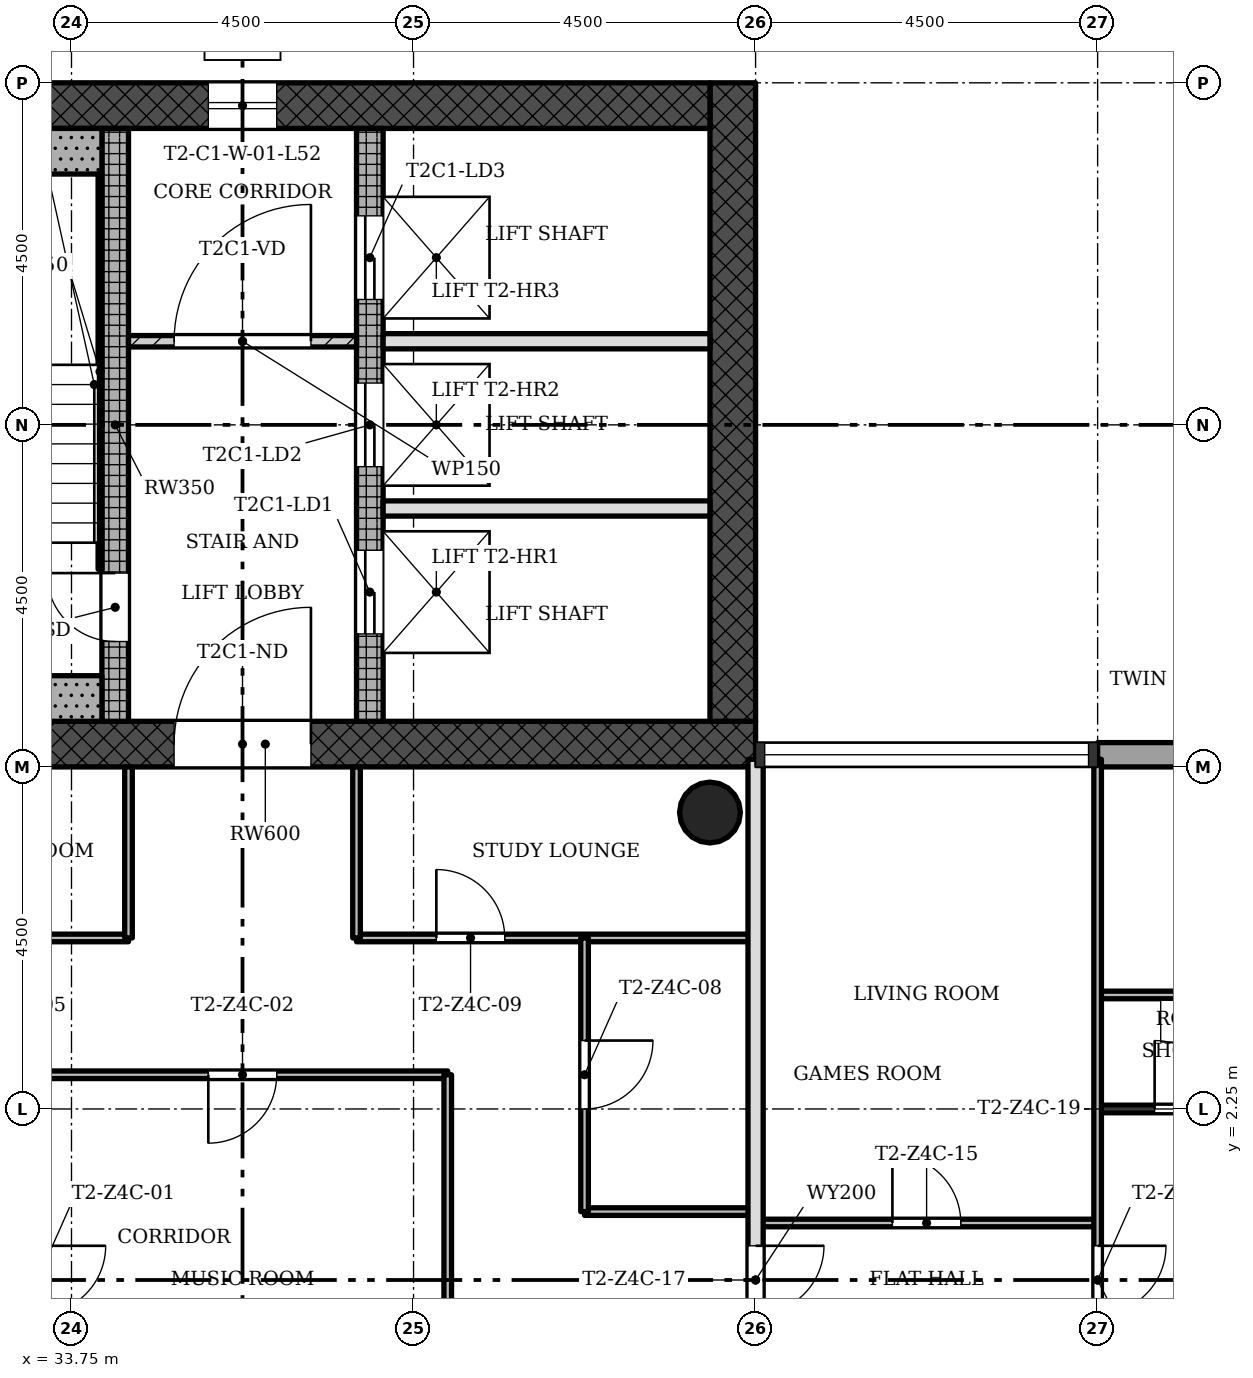
"""IFC4 building model, lengths in metres.
Left out: names, types, materials, properties, quantities, classifications, styles, units other than length and angle.
Written with IfcOpenShell. Run it as: python <this file> out.ifc"""

import sys

from ifc_helpers import new_model, si_unit, direction, frame, frame_2d, origin, origin_2d, place, context, subcontext, project, spatial, rectangle, hollow_circle, extrude, element, fill, save


model = new_model("IFC4")
c1 = context("Model", 3, precision=1e-05, world=origin(), true_north=direction((0.0, 1.0)))
c2 = subcontext(c1, "Body", "Model", "MODEL_VIEW")
j1 = project(units=[si_unit("LENGTHUNIT", "METRE"), si_unit("PLANEANGLEUNIT", "RADIAN")], contexts=[c1])
p1 = place(None, origin())
s1 = spatial("IfcSite", under=j1, at=p1, CompositionType="ELEMENT")
p2 = place(p1, origin())
s2 = spatial("IfcBuilding", under=s1, at=p2, CompositionType="ELEMENT")
p3 = place(p2, frame((0.0, 0.0, 189.2)))
s3 = spatial("IfcBuildingStorey", under=s2, at=p3, CompositionType="ELEMENT", Elevation=189.2)
p4 = place(p3, frame((29.85, 7.05, 0.0), z_axis=(0.0, 0.0, 1.0), x_axis=(1.0, 0.0, 0.0)))
e1 = element("IfcWall", 1, at=p4, inside=s3, PredefinedType="SHEAR", context=c2, shape_type="SweptSolid", body=[
    extrude(rectangle(XDim=12.9, YDim=0.6, at=frame_2d((6.45, 0.0))), origin(), (0.0, 0.0, 1.0), 3.4),
])
p5 = place(p4, frame((5.25, 0.0, 0.0)))
e2 = element("IfcOpeningElement", 2, at=p5, cuts=e1, PredefinedType="OPENING", context=c2, shape_type="SweptSolid", body=[
    extrude(rectangle(XDim=1.8, YDim=2.1, at=frame_2d((0.9, 1.05))), frame((0.0, 0.31, 0.0), z_axis=(0.0, -1.0, 0.0), x_axis=(1.0, 0.0, 0.0)), (0.0, 0.0, 1.0), 0.62),
])
p6 = place(p3, frame((42.45, 7.35, 0.0), z_axis=(0.0, 0.0, 1.0), x_axis=(0.0, 1.0, 0.0)))
e3 = element("IfcWall", 3, at=p6, inside=s3, PredefinedType="SHEAR", context=c2, shape_type="SweptSolid", body=[
    extrude(rectangle(XDim=8.4, YDim=0.6, at=frame_2d((4.2, 0.0))), origin(), (0.0, 0.0, 1.0), 3.4),
])
p7 = place(p3, frame((42.15, 15.45, 0.0), z_axis=(0.0, 0.0, 1.0), x_axis=(-1.0, 0.0, 0.0)))
e4 = element("IfcWall", 4, at=p7, inside=s3, PredefinedType="SHEAR", context=c2, shape_type="SweptSolid", body=[
    extrude(rectangle(XDim=12.9, YDim=0.6, at=frame_2d((6.45, 0.0))), origin(), (0.0, 0.0, 1.0), 3.4),
])
p8 = place(p7, frame((5.7, 0.0, 0.45)))
e5 = element("IfcOpeningElement", 5, at=p8, cuts=e4, PredefinedType="OPENING", context=c2, shape_type="SweptSolid", body=[
    extrude(rectangle(XDim=0.9, YDim=2.4, at=frame_2d((0.45, 1.2))), frame((0.0, 0.31, 0.0), z_axis=(0.0, -1.0, 0.0), x_axis=(1.0, 0.0, 0.0)), (0.0, 0.0, 1.0), 0.62),
])
p9 = place(p3, frame((34.325, 7.35, 0.0), z_axis=(0.0, 0.0, 1.0), x_axis=(0.0, 1.0, 0.0)))
e6 = element("IfcWall", 6, at=p9, inside=s3, PredefinedType="SHEAR", context=c2, shape_type="SweptSolid", body=[
    extrude(rectangle(XDim=7.8, YDim=0.35, at=frame_2d((3.9, 0.0))), origin(), (0.0, 0.0, 1.0), 3.4),
])
p10 = place(p9, frame((1.05, 0.0, 0.0)))
e7 = element("IfcOpeningElement", 7, at=p10, cuts=e6, PredefinedType="OPENING", context=c2, shape_type="SweptSolid", body=[
    extrude(rectangle(XDim=0.9, YDim=2.1, at=frame_2d((0.45, 1.05))), frame((0.0, 0.185, 0.0), z_axis=(0.0, -1.0, 0.0), x_axis=(1.0, 0.0, 0.0)), (0.0, 0.0, 1.0), 0.37),
])
p11 = place(p3, frame((37.675, 7.35, 0.0), z_axis=(0.0, 0.0, 1.0), x_axis=(0.0, 1.0, 0.0)))
e8 = element("IfcWall", 8, at=p11, inside=s3, PredefinedType="SHEAR", context=c2, shape_type="SweptSolid", body=[
    extrude(rectangle(XDim=7.8, YDim=0.35, at=frame_2d((3.9, 0.0))), origin(), (0.0, 0.0, 1.0), 3.4),
])
p12 = place(p11, frame((1.15, 0.0, 0.0)))
e9 = element("IfcOpeningElement", 9, at=p12, cuts=e8, PredefinedType="OPENING", context=c2, shape_type="SweptSolid", body=[
    extrude(rectangle(XDim=1.1, YDim=2.1, at=frame_2d((0.55, 1.05))), frame((0.0, 0.185, 0.0), z_axis=(0.0, -1.0, 0.0), x_axis=(1.0, 0.0, 0.0)), (0.0, 0.0, 1.0), 0.37),
])
p13 = place(p11, frame((3.35, 0.0, 0.0)))
e10 = element("IfcOpeningElement", 10, at=p13, cuts=e8, PredefinedType="OPENING", context=c2, shape_type="SweptSolid", body=[
    extrude(rectangle(XDim=1.1, YDim=2.1, at=frame_2d((0.55, 1.05))), frame((0.0, 0.185, 0.0), z_axis=(0.0, -1.0, 0.0), x_axis=(1.0, 0.0, 0.0)), (0.0, 0.0, 1.0), 0.37),
])
p14 = place(p11, frame((5.55, 0.0, 0.0)))
e11 = element("IfcOpeningElement", 11, at=p14, cuts=e8, PredefinedType="OPENING", context=c2, shape_type="SweptSolid", body=[
    extrude(rectangle(XDim=1.1, YDim=2.1, at=frame_2d((0.55, 1.05))), frame((0.0, 0.185, 0.0), z_axis=(0.0, -1.0, 0.0), x_axis=(1.0, 0.0, 0.0)), (0.0, 0.0, 1.0), 0.37),
])
p15 = place(p3, frame((42.15, 6.15, 0.0), z_axis=(0.0, 0.0, 1.0), x_axis=(1.0, 0.0, 0.0)))
e12 = element("IfcColumn", 12, at=p15, inside=s3, PredefinedType="COLUMN", context=c2, shape_type="SweptSolid", body=[
    extrude(hollow_circle(Radius=0.4, WallThickness=0.028, at=origin_2d()), origin(), (0.0, 0.0, 1.0), 3.4),
])
p16 = place(p3, frame((48.75, 6.91, -0.3), z_axis=(0.0, 0.0, 1.0), x_axis=(-1.0, 0.0, 0.0)))
e13 = element("IfcWall", 13, at=p16, inside=s3, PredefinedType="STANDARD", context=c2, shape_type="SweptSolid", body=[
    extrude(rectangle(XDim=1.5, YDim=0.32, at=frame_2d((0.75, 0.0))), origin(), (0.0, 0.0, 1.0), 3.4),
])
p17 = place(p3, frame((37.5, 12.35, 0.0), z_axis=(0.0, 0.0, 1.0), x_axis=(-1.0, 0.0, 0.0)))
e14 = element("IfcWall", 14, at=p17, inside=s3, PredefinedType="PARTITIONING", context=c2, shape_type="SweptSolid", body=[
    extrude(rectangle(XDim=3.0, YDim=0.15, at=frame_2d((1.5, 0.0))), origin(), (0.0, 0.0, 1.0), 3.0),
])
p18 = place(p17, frame((0.6, 0.0, 0.0)))
e15 = element("IfcOpeningElement", 15, at=p18, cuts=e14, PredefinedType="OPENING", context=c2, shape_type="SweptSolid", body=[
    extrude(rectangle(XDim=1.8, YDim=2.1, at=frame_2d((0.9, 1.05))), frame((0.0, 0.085, 0.0), z_axis=(0.0, -1.0, 0.0), x_axis=(1.0, 0.0, 0.0)), (0.0, 0.0, 1.0), 0.17),
])
for number, where, z_axis, x_axis in (
    (16, (42.15, 10.15, 0.0), (0.0, 0.0, 1.0), (-1.0, 0.0, 0.0)),
    (17, (42.15, 12.35, 0.0), (0.0, 0.0, 1.0), (-1.0, 0.0, 0.0)),
):
    element("IfcWall", number, at=place(p3, frame(where, z_axis=z_axis, x_axis=x_axis)), inside=s3, PredefinedType="SOLIDWALL", context=c2, shape_type="SweptSolid", body=[
        extrude(rectangle(XDim=4.3, YDim=0.2, at=frame_2d((2.15, 0.0))), origin(), (0.0, 0.0, 1.0), 3.0),
    ])
p19 = place(p3, frame((47.25, 0.75, 0.0), z_axis=(0.0, 0.0, 1.0), x_axis=(-1.0, 0.0, 0.0)))
e18 = element("IfcWall", 18, at=p19, inside=s3, PredefinedType="PARTITIONING", context=c2, shape_type="SweptSolid", body=[
    extrude(rectangle(XDim=4.5, YDim=0.1, at=frame_2d((2.25, 0.0))), origin(), (0.0, 0.0, 1.0), 3.0),
])
p20 = place(p19, frame((1.8, 0.0, 0.0)))
e19 = element("IfcOpeningElement", 19, at=p20, cuts=e18, PredefinedType="OPENING", context=c2, shape_type="SweptSolid", body=[
    extrude(rectangle(XDim=0.9, YDim=2.1, at=frame_2d((0.45, 1.05))), frame((0.0, 0.06, 0.0), z_axis=(0.0, -1.0, 0.0), x_axis=(1.0, 0.0, 0.0)), (0.0, 0.0, 1.0), 0.12),
])
p21 = place(p3, frame((42.75, 0.9, 0.0), z_axis=(0.0, 0.0, 1.0), x_axis=(-1.0, 0.0, 0.0)))
e20 = element("IfcWall", 20, at=p21, inside=s3, PredefinedType="PARTITIONING", context=c2, shape_type="SweptSolid", body=[
    extrude(rectangle(XDim=2.25, YDim=0.1, at=frame_2d((1.125, 0.0))), origin(), (0.0, 0.0, 1.0), 3.0),
])
p22 = place(p3, frame((51.85, 2.25, 0.0), z_axis=(0.0, 0.0, 1.0), x_axis=(-1.0, 0.0, 0.0)))
e21 = element("IfcWall", 21, at=p22, inside=s3, PredefinedType="PARTITIONING", context=c2, shape_type="SweptSolid", body=[
    extrude(rectangle(XDim=4.6, YDim=0.1, at=frame_2d((2.3, 0.0))), origin(), (0.0, 0.0, 1.0), 3.0),
])
p23 = place(p22, frame((2.95, 0.0, 0.0)))
e22 = element("IfcOpeningElement", 22, at=p23, cuts=e21, PredefinedType="OPENING", context=c2, shape_type="SweptSolid", body=[
    extrude(rectangle(XDim=0.9, YDim=2.1, at=frame_2d((0.45, 1.05))), frame((0.0, 0.06, 0.0), z_axis=(0.0, -1.0, 0.0), x_axis=(1.0, 0.0, 0.0)), (0.0, 0.0, 1.0), 0.12),
])
p24 = place(p22, frame((1.15, 0.0, 0.0)))
e23 = element("IfcOpeningElement", 23, at=p24, cuts=e21, PredefinedType="OPENING", context=c2, shape_type="SweptSolid", body=[
    extrude(rectangle(XDim=0.9, YDim=2.1, at=frame_2d((0.45, 1.05))), frame((0.0, 0.06, 0.0), z_axis=(0.0, -1.0, 0.0), x_axis=(1.0, 0.0, 0.0)), (0.0, 0.0, 1.0), 0.12),
])
p25 = place(p3, frame((38.7, 2.7, 0.0), z_axis=(0.0, 0.0, 1.0), x_axis=(-1.0, 0.0, 0.0)))
e24 = element("IfcWall", 24, at=p25, inside=s3, PredefinedType="PARTITIONING", context=c2, shape_type="SweptSolid", body=[
    extrude(rectangle(XDim=5.4, YDim=0.1, at=frame_2d((2.7, 0.0))), origin(), (0.0, 0.0, 1.0), 3.0),
])
p26 = place(p25, frame((2.25, 0.0, 0.0)))
e25 = element("IfcOpeningElement", 25, at=p26, cuts=e24, PredefinedType="OPENING", context=c2, shape_type="SweptSolid", body=[
    extrude(rectangle(XDim=0.9, YDim=2.1, at=frame_2d((0.45, 1.05))), frame((0.0, 0.06, 0.0), z_axis=(0.0, -1.0, 0.0), x_axis=(1.0, 0.0, 0.0)), (0.0, 0.0, 1.0), 0.12),
])
p27 = place(p3, frame((49.65, 3.75, 0.0), z_axis=(0.0, 0.0, 1.0), x_axis=(-1.0, 0.0, 0.0)))
e26 = element("IfcWall", 26, at=p27, inside=s3, PredefinedType="PARTITIONING", context=c2, shape_type="SweptSolid", body=[
    extrude(rectangle(XDim=2.4, YDim=0.1, at=frame_2d((1.2, 0.0))), origin(), (0.0, 0.0, 1.0), 3.0),
])
p28 = place(p3, frame((42.75, 4.5, 0.0), z_axis=(0.0, 0.0, 1.0), x_axis=(-1.0, 0.0, 0.0)))
e27 = element("IfcWall", 27, at=p28, inside=s3, PredefinedType="PARTITIONING", context=c2, shape_type="SweptSolid", body=[
    extrude(rectangle(XDim=5.25, YDim=0.1, at=frame_2d((2.625, 0.0))), origin(), (0.0, 0.0, 1.0), 3.0),
])
p29 = place(p28, frame((3.3, 0.0, 0.0)))
e28 = element("IfcOpeningElement", 28, at=p29, cuts=e27, PredefinedType="OPENING", context=c2, shape_type="SweptSolid", body=[
    extrude(rectangle(XDim=0.9, YDim=2.1, at=frame_2d((0.45, 1.05))), frame((0.0, 0.06, 0.0), z_axis=(0.0, -1.0, 0.0), x_axis=(1.0, 0.0, 0.0)), (0.0, 0.0, 1.0), 0.12),
])
p30 = place(p3, frame((34.5, 4.5, 0.0), z_axis=(0.0, 0.0, 1.0), x_axis=(-1.0, 0.0, 0.0)))
e29 = element("IfcWall", 29, at=p30, inside=s3, PredefinedType="PARTITIONING", context=c2, shape_type="SweptSolid", body=[
    extrude(rectangle(XDim=3.0, YDim=0.1, at=frame_2d((1.5, 0.0))), origin(), (0.0, 0.0, 1.0), 3.0),
])
p31 = place(p30, frame((1.05, 0.0, 0.0)))
e30 = element("IfcOpeningElement", 30, at=p31, cuts=e29, PredefinedType="OPENING", context=c2, shape_type="SweptSolid", body=[
    extrude(rectangle(XDim=0.9, YDim=2.1, at=frame_2d((0.45, 1.05))), frame((0.0, 0.06, 0.0), z_axis=(0.0, -1.0, 0.0), x_axis=(1.0, 0.0, 0.0)), (0.0, 0.0, 1.0), 0.12),
])
p32 = place(p3, frame((47.25, -6.85, 0.0), z_axis=(0.0, 0.0, 1.0), x_axis=(0.0, 1.0, 0.0)))
e31 = element("IfcWall", 31, at=p32, inside=s3, PredefinedType="PARTITIONING", context=c2, shape_type="SweptSolid", body=[
    extrude(rectangle(XDim=13.7, YDim=0.1, at=frame_2d((6.85, 0.0))), origin(), (0.0, 0.0, 1.0), 3.0),
])
p33 = place(p32, frame((6.4, 0.0, 0.0)))
e32 = element("IfcOpeningElement", 32, at=p33, cuts=e31, PredefinedType="OPENING", context=c2, shape_type="SweptSolid", body=[
    extrude(rectangle(XDim=0.9, YDim=2.1, at=frame_2d((0.45, 1.05))), frame((0.0, 0.06, 0.0), z_axis=(0.0, -1.0, 0.0), x_axis=(1.0, 0.0, 0.0)), (0.0, 0.0, 1.0), 0.12),
])
p34 = place(p3, frame((42.75, -6.85, 0.0), z_axis=(0.0, 0.0, 1.0), x_axis=(0.0, 1.0, 0.0)))
e33 = element("IfcWall", 33, at=p34, inside=s3, PredefinedType="SOLIDWALL", context=c2, shape_type="SweptSolid", body=[
    extrude(rectangle(XDim=13.7, YDim=0.2, at=frame_2d((6.85, 0.0))), origin(), (0.0, 0.0, 1.0), 3.0),
])
p35 = place(p34, frame((6.4, 0.0, 0.0)))
e34 = element("IfcOpeningElement", 34, at=p35, cuts=e33, PredefinedType="OPENING", context=c2, shape_type="SweptSolid", body=[
    extrude(rectangle(XDim=0.9, YDim=2.1, at=frame_2d((0.45, 1.05))), frame((0.0, 0.11, 0.0), z_axis=(0.0, -1.0, 0.0), x_axis=(1.0, 0.0, 0.0)), (0.0, 0.0, 1.0), 0.22),
])
p36 = place(p3, frame((40.5, 0.9, 0.0), z_axis=(0.0, 0.0, 1.0), x_axis=(0.0, 1.0, 0.0)))
e35 = element("IfcWall", 35, at=p36, inside=s3, PredefinedType="PARTITIONING", context=c2, shape_type="SweptSolid", body=[
    extrude(rectangle(XDim=3.6, YDim=0.1, at=frame_2d((1.8, 0.0))), origin(), (0.0, 0.0, 1.0), 3.0),
])
p37 = place(p36, frame((1.35, 0.0, 0.0)))
e36 = element("IfcOpeningElement", 36, at=p37, cuts=e35, PredefinedType="OPENING", context=c2, shape_type="SweptSolid", body=[
    extrude(rectangle(XDim=0.9, YDim=2.1, at=frame_2d((0.45, 1.05))), frame((0.0, 0.06, 0.0), z_axis=(0.0, -1.0, 0.0), x_axis=(1.0, 0.0, 0.0)), (0.0, 0.0, 1.0), 0.12),
])
p38 = place(p3, frame((38.7, -2.7, 0.0), z_axis=(0.0, 0.0, 1.0), x_axis=(0.0, 1.0, 0.0)))
e37 = element("IfcWall", 37, at=p38, inside=s3, PredefinedType="PARTITIONING", context=c2, shape_type="SweptSolid", body=[
    extrude(rectangle(XDim=5.4, YDim=0.1, at=frame_2d((2.7, 0.0))), origin(), (0.0, 0.0, 1.0), 3.0),
])
for number, where, z_axis, x_axis in (
    (38, (37.5, 4.5, 0.0), (0.0, 0.0, 1.0), (0.0, 1.0, 0.0)),
    (39, (34.5, 4.5, 0.0), (0.0, 0.0, 1.0), (0.0, 1.0, 0.0)),
):
    element("IfcWall", number, at=place(p3, frame(where, z_axis=z_axis, x_axis=x_axis)), inside=s3, PredefinedType="PARTITIONING", context=c2, shape_type="SweptSolid", body=[
        extrude(rectangle(XDim=2.25, YDim=0.1, at=frame_2d((1.125, 0.0))), origin(), (0.0, 0.0, 1.0), 3.0),
    ])
for number, where, z_axis, x_axis in (
    (40, (34.15, 14.85, 0.0), (0.0, 0.0, 1.0), (-1.0, 0.0, 0.0)),
    (41, (34.15, 7.65, 0.0), (0.0, 0.0, 1.0), (-1.0, 0.0, 0.0)),
):
    element("IfcWall", number, at=place(p3, frame(where, z_axis=z_axis, x_axis=x_axis)), inside=s3, PredefinedType="SHEAR", context=c2, shape_type="SweptSolid", body=[
        extrude(rectangle(XDim=4.3, YDim=0.6, at=frame_2d((2.15, 0.0))), origin(), (0.0, 0.0, 1.0), 3.4),
    ])
p39 = place(p3, frame((34.125, 9.35, 0.0), z_axis=(0.0, 0.0, 1.0), x_axis=(0.0, 1.0, 0.0)))
e42 = element("IfcWall", 42, at=p39, inside=s3, PredefinedType="SHEAR", context=c2, shape_type="SweptSolid", body=[
    extrude(rectangle(XDim=5.2, YDim=0.05, at=frame_2d((2.6, 0.0))), origin(), (0.0, 0.0, 1.0), 3.4),
])
p40 = place(p8, origin())
e43 = element("IfcWindow", 43, at=p40, inside=s3, PartitioningType="SINGLE_PANEL", PredefinedType="WINDOW", context=c2, shape_type="SweptSolid", body=[
    extrude(rectangle(XDim=0.9, YDim=2.4, at=frame_2d((0.45, 1.2))), frame((0.0, 0.03, 0.0), z_axis=(0.0, -1.0, 0.0), x_axis=(1.0, 0.0, 0.0)), (0.0, 0.0, 1.0), 0.06),
])
fill(e5, e43)
p41 = place(p18, origin())
e44 = element("IfcDoor", 44, at=p41, inside=s3, OperationType="SINGLE_SWING_LEFT", PredefinedType="DOOR", context=c2, shape_type="SweptSolid", body=[
    extrude(rectangle(XDim=1.8, YDim=2.1, at=frame_2d((0.9, 1.05))), frame((0.0, 0.025, 0.0), z_axis=(0.0, -1.0, 0.0), x_axis=(1.0, 0.0, 0.0)), (0.0, 0.0, 1.0), 0.05),
])
fill(e15, e44)
p42 = place(p26, origin())
e45 = element("IfcDoor", 45, at=p42, inside=s3, OperationType="SINGLE_SWING_LEFT", PredefinedType="DOOR", context=c2, shape_type="SweptSolid", body=[
    extrude(rectangle(XDim=0.9, YDim=2.1, at=frame_2d((0.45, 1.05))), frame((0.0, 0.025, 0.0), z_axis=(0.0, -1.0, 0.0), x_axis=(1.0, 0.0, 0.0)), (0.0, 0.0, 1.0), 0.05),
])
fill(e25, e45)
p43 = place(p37, origin())
e46 = element("IfcDoor", 46, at=p43, inside=s3, OperationType="SINGLE_SWING_RIGHT", PredefinedType="DOOR", context=c2, shape_type="SweptSolid", body=[
    extrude(rectangle(XDim=0.9, YDim=2.1, at=frame_2d((0.45, 1.05))), frame((0.0, 0.025, 0.0), z_axis=(0.0, -1.0, 0.0), x_axis=(1.0, 0.0, 0.0)), (0.0, 0.0, 1.0), 0.05),
])
fill(e36, e46)
p44 = place(p29, origin())
e47 = element("IfcDoor", 47, at=p44, inside=s3, OperationType="SINGLE_SWING_RIGHT", PredefinedType="DOOR", context=c2, shape_type="SweptSolid", body=[
    extrude(rectangle(XDim=0.9, YDim=2.1, at=frame_2d((0.45, 1.05))), frame((0.0, 0.025, 0.0), z_axis=(0.0, -1.0, 0.0), x_axis=(1.0, 0.0, 0.0)), (0.0, 0.0, 1.0), 0.05),
])
fill(e28, e47)
p45 = place(p20, origin())
e48 = element("IfcDoor", 48, at=p45, inside=s3, OperationType="SINGLE_SWING_RIGHT", PredefinedType="DOOR", context=c2, shape_type="SweptSolid", body=[
    extrude(rectangle(XDim=0.9, YDim=2.1, at=frame_2d((0.45, 1.05))), frame((0.0, 0.025, 0.0), z_axis=(0.0, -1.0, 0.0), x_axis=(1.0, 0.0, 0.0)), (0.0, 0.0, 1.0), 0.05),
])
fill(e19, e48)
p46 = place(p35, origin())
e49 = element("IfcDoor", 49, at=p46, inside=s3, OperationType="SINGLE_SWING_RIGHT", PredefinedType="DOOR", context=c2, shape_type="SweptSolid", body=[
    extrude(rectangle(XDim=0.9, YDim=2.1, at=frame_2d((0.45, 1.05))), frame((0.0, 0.025, 0.0), z_axis=(0.0, -1.0, 0.0), x_axis=(1.0, 0.0, 0.0)), (0.0, 0.0, 1.0), 0.05),
])
fill(e34, e49)
p47 = place(p33, origin())
e50 = element("IfcDoor", 50, at=p47, inside=s3, OperationType="SINGLE_SWING_RIGHT", PredefinedType="DOOR", context=c2, shape_type="SweptSolid", body=[
    extrude(rectangle(XDim=0.9, YDim=2.1, at=frame_2d((0.45, 1.05))), frame((0.0, 0.025, 0.0), z_axis=(0.0, -1.0, 0.0), x_axis=(1.0, 0.0, 0.0)), (0.0, 0.0, 1.0), 0.05),
])
fill(e32, e50)
p48 = place(p23, origin())
e51 = element("IfcDoor", 51, at=p48, inside=s3, OperationType="SINGLE_SWING_RIGHT", PredefinedType="DOOR", context=c2, shape_type="SweptSolid", body=[
    extrude(rectangle(XDim=0.9, YDim=2.1, at=frame_2d((0.45, 1.05))), frame((0.0, 0.025, 0.0), z_axis=(0.0, -1.0, 0.0), x_axis=(1.0, 0.0, 0.0)), (0.0, 0.0, 1.0), 0.05),
])
fill(e22, e51)
p49 = place(p10, origin())
e52 = element("IfcDoor", 52, at=p49, inside=s3, OperationType="SINGLE_SWING_LEFT", PredefinedType="DOOR", context=c2, shape_type="SweptSolid", body=[
    extrude(rectangle(XDim=0.9, YDim=2.1, at=frame_2d((0.45, 1.05))), frame((0.0, 0.025, 0.0), z_axis=(0.0, -1.0, 0.0), x_axis=(1.0, 0.0, 0.0)), (0.0, 0.0, 1.0), 0.05),
])
fill(e7, e52)
p50 = place(p12, origin())
e53 = element("IfcDoor", 53, at=p50, inside=s3, OperationType="SLIDING_TO_LEFT", PredefinedType="DOOR", context=c2, shape_type="SweptSolid", body=[
    extrude(rectangle(XDim=1.1, YDim=2.1, at=frame_2d((0.55, 1.05))), frame((0.0, 0.025, 0.0), z_axis=(0.0, -1.0, 0.0), x_axis=(1.0, 0.0, 0.0)), (0.0, 0.0, 1.0), 0.05),
])
fill(e9, e53)
p51 = place(p13, origin())
e54 = element("IfcDoor", 54, at=p51, inside=s3, OperationType="SLIDING_TO_LEFT", PredefinedType="DOOR", context=c2, shape_type="SweptSolid", body=[
    extrude(rectangle(XDim=1.1, YDim=2.1, at=frame_2d((0.55, 1.05))), frame((0.0, 0.025, 0.0), z_axis=(0.0, -1.0, 0.0), x_axis=(1.0, 0.0, 0.0)), (0.0, 0.0, 1.0), 0.05),
])
fill(e10, e54)
p52 = place(p14, origin())
e55 = element("IfcDoor", 55, at=p52, inside=s3, OperationType="SLIDING_TO_LEFT", PredefinedType="DOOR", context=c2, shape_type="SweptSolid", body=[
    extrude(rectangle(XDim=1.1, YDim=2.1, at=frame_2d((0.55, 1.05))), frame((0.0, 0.025, 0.0), z_axis=(0.0, -1.0, 0.0), x_axis=(1.0, 0.0, 0.0)), (0.0, 0.0, 1.0), 0.05),
])
fill(e11, e55)
p53 = place(p5, origin())
e56 = element("IfcDoor", 56, at=p53, inside=s3, OperationType="SINGLE_SWING_LEFT", PredefinedType="DOOR", context=c2, shape_type="SweptSolid", body=[
    extrude(rectangle(XDim=1.8, YDim=2.1, at=frame_2d((0.9, 1.05))), frame((0.0, 0.025, 0.0), z_axis=(0.0, -1.0, 0.0), x_axis=(1.0, 0.0, 0.0)), (0.0, 0.0, 1.0), 0.05),
])
fill(e2, e56)
save(model, sys.argv[1])
